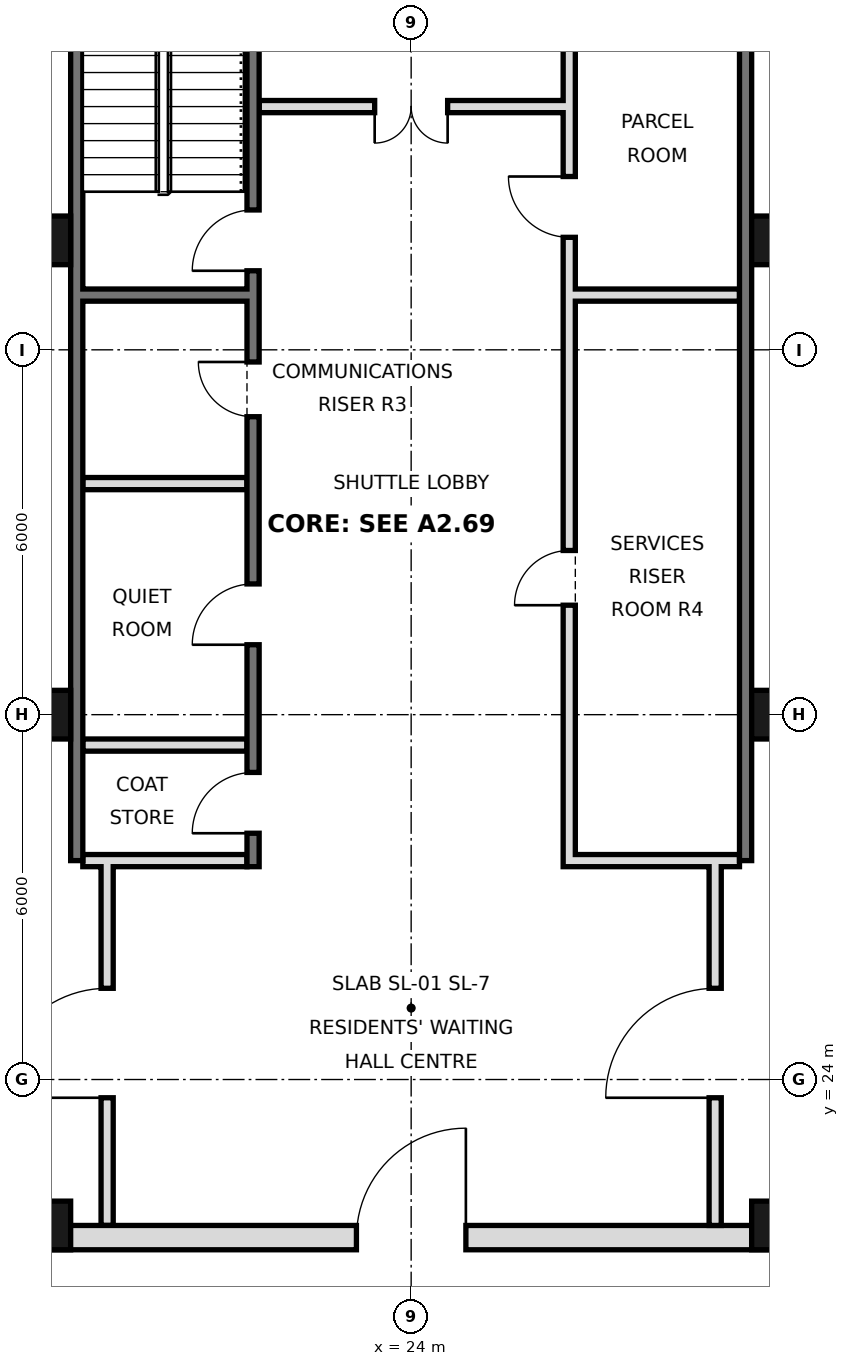
"""IFC4 building model, lengths in metres.
Left out: names, types, materials, properties, quantities, classifications, styles, units other than length and angle.
Written with IfcOpenShell. Run it as: python <this file> out.ifc"""

import sys

from ifc_helpers import new_model, si_unit, direction, frame, frame_2d, origin, origin_2d, place, context, subcontext, project, spatial, rectangle, hollow_rectangle, extrude, element, fill, save


model = new_model("IFC4")
c1 = context("Model", 3, precision=1e-05, world=origin(), true_north=direction((0.0, 1.0)))
c2 = subcontext(c1, "Body", "Model", "MODEL_VIEW")
j1 = project(units=[si_unit("LENGTHUNIT", "METRE"), si_unit("PLANEANGLEUNIT", "RADIAN")], contexts=[c1])
p1 = place(None, origin())
s1 = spatial("IfcSite", under=j1, at=p1, CompositionType="ELEMENT")
p2 = place(p1, origin())
s2 = spatial("IfcBuilding", under=s1, at=p2, CompositionType="ELEMENT")
p3 = place(p2, frame((0.0, 0.0, 273.8)))
s3 = spatial("IfcBuildingStorey", under=s2, at=p3, CompositionType="ELEMENT", Elevation=273.8)
for number, where, z_axis, x_axis in (
    (1, (18.0, 21.6, 0.0), (0.0, 0.0, 1.0), (1.0, 0.0, 0.0)),
    (2, (18.0, 30.0, 0.0), (0.0, 0.0, 1.0), (1.0, 0.0, 0.0)),
    (3, (18.0, 37.8, 0.0), (0.0, 0.0, 1.0), (1.0, 0.0, 0.0)),
    (4, (30.0, 21.6, 0.0), (0.0, 0.0, 1.0), (1.0, 0.0, 0.0)),
    (5, (30.0, 30.0, 0.0), (0.0, 0.0, 1.0), (1.0, 0.0, 0.0)),
    (6, (30.0, 37.8, 0.0), (0.0, 0.0, 1.0), (1.0, 0.0, 0.0)),
):
    element("IfcColumn", number, at=place(p3, frame(where, z_axis=z_axis, x_axis=x_axis)), inside=s3, PredefinedType="COLUMN", context=c2, shape_type="SweptSolid", body=[
        extrude(hollow_rectangle(XDim=0.8, YDim=0.8, WallThickness=0.032, at=origin_2d()), origin(), (0.0, 0.0, 1.0), 3.6),
    ])
for number, where, z_axis, x_axis in (
    (7, (18.5, 27.6, 0.0), (0.0, 0.0, 1.0), (0.0, 1.0, 0.0)),
    (8, (29.5, 27.6, 0.0), (0.0, 0.0, 1.0), (0.0, 1.0, 0.0)),
):
    element("IfcWall", number, at=place(p3, frame(where, z_axis=z_axis, x_axis=x_axis)), inside=s3, PredefinedType="SOLIDWALL", context=c2, shape_type="SweptSolid", body=[
        extrude(rectangle(XDim=17.5, YDim=0.2, at=frame_2d((8.75, 0.0))), origin(), (0.0, 0.0, 1.0), 3.42),
    ])
p4 = place(p3, frame((5.6, 21.4, 0.0), z_axis=(0.0, 0.0, 1.0), x_axis=(1.0, 0.0, 0.0)))
e9 = element("IfcWall", 9, at=p4, inside=s3, PredefinedType="SOLIDWALL", context=c2, shape_type="SweptSolid", body=[
    extrude(rectangle(XDim=36.8, YDim=0.4, at=frame_2d((18.4, 0.0))), origin(), (0.0, 0.0, 1.0), 3.42),
])
p5 = place(p4, frame((8.5, 0.0, 0.0)))
e10 = element("IfcOpeningElement", 10, at=p5, cuts=e9, PredefinedType="OPENING", context=c2, shape_type="SweptSolid", body=[
    extrude(rectangle(XDim=1.8, YDim=2.1, at=frame_2d((0.9, 1.05))), frame((0.0, 0.21, 0.0), z_axis=(0.0, -1.0, 0.0), x_axis=(1.0, 0.0, 0.0)), (0.0, 0.0, 1.0), 0.42),
])
p6 = place(p4, frame((17.5, 0.0, 0.0)))
e11 = element("IfcOpeningElement", 11, at=p6, cuts=e9, PredefinedType="OPENING", context=c2, shape_type="SweptSolid", body=[
    extrude(rectangle(XDim=1.8, YDim=2.1, at=frame_2d((0.9, 1.05))), frame((0.0, 0.21, 0.0), z_axis=(0.0, -1.0, 0.0), x_axis=(1.0, 0.0, 0.0)), (0.0, 0.0, 1.0), 0.42),
])
p7 = place(p4, frame((26.5, 0.0, 0.0)))
e12 = element("IfcOpeningElement", 12, at=p7, cuts=e9, PredefinedType="OPENING", context=c2, shape_type="SweptSolid", body=[
    extrude(rectangle(XDim=1.8, YDim=2.1, at=frame_2d((0.9, 1.05))), frame((0.0, 0.21, 0.0), z_axis=(0.0, -1.0, 0.0), x_axis=(1.0, 0.0, 0.0)), (0.0, 0.0, 1.0), 0.42),
])
p8 = place(p4, frame((4.5, 0.0, 0.0)))
e13 = element("IfcOpeningElement", 13, at=p8, cuts=e9, PredefinedType="OPENING", context=c2, shape_type="SweptSolid", body=[
    extrude(rectangle(XDim=1.2, YDim=2.1, at=frame_2d((0.6, 1.05))), frame((0.0, 0.21, 0.0), z_axis=(0.0, -1.0, 0.0), x_axis=(1.0, 0.0, 0.0)), (0.0, 0.0, 1.0), 0.42),
])
p9 = place(p4, frame((31.1, 0.0, 0.0)))
e14 = element("IfcOpeningElement", 14, at=p9, cuts=e9, PredefinedType="OPENING", context=c2, shape_type="SweptSolid", body=[
    extrude(rectangle(XDim=1.2, YDim=2.1, at=frame_2d((0.6, 1.05))), frame((0.0, 0.21, 0.0), z_axis=(0.0, -1.0, 0.0), x_axis=(1.0, 0.0, 0.0)), (0.0, 0.0, 1.0), 0.42),
])
p10 = place(p3, frame((19.0, 21.6, 0.0), z_axis=(0.0, 0.0, 1.0), x_axis=(0.0, 1.0, 0.0)))
e15 = element("IfcWall", 15, at=p10, inside=s3, PredefinedType="PARTITIONING", context=c2, shape_type="SweptSolid", body=[
    extrude(rectangle(XDim=6.0, YDim=0.2, at=frame_2d((3.0, 0.0))), origin(), (0.0, 0.0, 1.0), 3.42),
])
p11 = place(p10, frame((2.1, 0.0, 0.0)))
e16 = element("IfcOpeningElement", 16, at=p11, cuts=e15, PredefinedType="OPENING", context=c2, shape_type="SweptSolid", body=[
    extrude(rectangle(XDim=1.8, YDim=2.1, at=frame_2d((0.9, 1.05))), frame((0.0, 0.11, 0.0), z_axis=(0.0, -1.0, 0.0), x_axis=(1.0, 0.0, 0.0)), (0.0, 0.0, 1.0), 0.22),
])
p12 = place(p3, frame((29.0, 21.6, 0.0), z_axis=(0.0, 0.0, 1.0), x_axis=(0.0, 1.0, 0.0)))
e17 = element("IfcWall", 17, at=p12, inside=s3, PredefinedType="PARTITIONING", context=c2, shape_type="SweptSolid", body=[
    extrude(rectangle(XDim=6.0, YDim=0.2, at=frame_2d((3.0, 0.0))), origin(), (0.0, 0.0, 1.0), 3.42),
])
p13 = place(p12, frame((2.1, 0.0, 0.0)))
e18 = element("IfcOpeningElement", 18, at=p13, cuts=e17, PredefinedType="OPENING", context=c2, shape_type="SweptSolid", body=[
    extrude(rectangle(XDim=1.8, YDim=2.1, at=frame_2d((0.9, 1.05))), frame((0.0, 0.11, 0.0), z_axis=(0.0, -1.0, 0.0), x_axis=(1.0, 0.0, 0.0)), (0.0, 0.0, 1.0), 0.22),
])
p14 = place(p3, frame((21.4, 27.5, 0.0), z_axis=(0.0, 0.0, 1.0), x_axis=(0.0, 1.0, 0.0)))
e19 = element("IfcWall", 19, at=p14, inside=s3, PredefinedType="SOLIDWALL", context=c2, shape_type="SweptSolid", body=[
    extrude(rectangle(XDim=17.5, YDim=0.2, at=frame_2d((8.75, 0.0))), origin(), (0.0, 0.0, 1.0), 3.42),
])
p15 = place(p14, frame((0.55, 0.0, 0.0)))
e20 = element("IfcOpeningElement", 20, at=p15, cuts=e19, PredefinedType="OPENING", context=c2, shape_type="SweptSolid", body=[
    extrude(rectangle(XDim=1.0, YDim=2.1, at=frame_2d((0.5, 1.05))), frame((0.0, 0.11, 0.0), z_axis=(0.0, -1.0, 0.0), x_axis=(1.0, 0.0, 0.0)), (0.0, 0.0, 1.0), 0.22),
])
p16 = place(p14, frame((3.65, 0.0, 0.0)))
e21 = element("IfcOpeningElement", 21, at=p16, cuts=e19, PredefinedType="OPENING", context=c2, shape_type="SweptSolid", body=[
    extrude(rectangle(XDim=1.0, YDim=2.1, at=frame_2d((0.5, 1.05))), frame((0.0, 0.11, 0.0), z_axis=(0.0, -1.0, 0.0), x_axis=(1.0, 0.0, 0.0)), (0.0, 0.0, 1.0), 0.22),
])
p17 = place(p14, frame((9.8, 0.0, 0.0)))
e22 = element("IfcOpeningElement", 22, at=p17, cuts=e19, PredefinedType="OPENING", context=c2, shape_type="SweptSolid", body=[
    extrude(rectangle(XDim=1.0, YDim=2.1, at=frame_2d((0.5, 1.05))), frame((0.0, 0.11, 0.0), z_axis=(0.0, -1.0, 0.0), x_axis=(1.0, 0.0, 0.0)), (0.0, 0.0, 1.0), 0.22),
])
p18 = place(p14, frame((7.4, 0.0, 0.0)))
e23 = element("IfcOpeningElement", 23, at=p18, cuts=e19, PredefinedType="OPENING", context=c2, shape_type="SweptSolid", body=[
    extrude(rectangle(XDim=0.9, YDim=2.1, at=frame_2d((0.45, 1.05))), frame((0.0, 0.11, 0.0), z_axis=(0.0, -1.0, 0.0), x_axis=(1.0, 0.0, 0.0)), (0.0, 0.0, 1.0), 0.22),
])
p19 = place(p3, frame((26.6, 27.5, 0.0), z_axis=(0.0, 0.0, 1.0), x_axis=(0.0, 1.0, 0.0)))
e24 = element("IfcWall", 24, at=p19, inside=s3, PredefinedType="SOLIDWALL", context=c2, shape_type="SweptSolid", body=[
    extrude(rectangle(XDim=17.5, YDim=0.2, at=frame_2d((8.75, 0.0))), origin(), (0.0, 0.0, 1.0), 3.42),
])
p20 = place(p19, frame((4.3, 0.0, 0.0)))
e25 = element("IfcOpeningElement", 25, at=p20, cuts=e24, PredefinedType="OPENING", context=c2, shape_type="SweptSolid", body=[
    extrude(rectangle(XDim=0.9, YDim=2.1, at=frame_2d((0.45, 1.05))), frame((0.0, 0.11, 0.0), z_axis=(0.0, -1.0, 0.0), x_axis=(1.0, 0.0, 0.0)), (0.0, 0.0, 1.0), 0.22),
])
p21 = place(p19, frame((10.35, 0.0, 0.0)))
e26 = element("IfcOpeningElement", 26, at=p21, cuts=e24, PredefinedType="OPENING", context=c2, shape_type="SweptSolid", body=[
    extrude(rectangle(XDim=1.0, YDim=2.1, at=frame_2d((0.5, 1.05))), frame((0.0, 0.11, 0.0), z_axis=(0.0, -1.0, 0.0), x_axis=(1.0, 0.0, 0.0)), (0.0, 0.0, 1.0), 0.22),
])
p22 = place(p19, frame((15.475, 0.0, 0.0)))
e27 = element("IfcOpeningElement", 27, at=p22, cuts=e24, PredefinedType="OPENING", context=c2, shape_type="SweptSolid", body=[
    extrude(rectangle(XDim=1.0, YDim=2.1, at=frame_2d((0.5, 1.05))), frame((0.0, 0.11, 0.0), z_axis=(0.0, -1.0, 0.0), x_axis=(1.0, 0.0, 0.0)), (0.0, 0.0, 1.0), 0.22),
])
p23 = place(p3, frame((18.6, 27.6, 0.0), z_axis=(0.0, 0.0, 1.0), x_axis=(1.0, 0.0, 0.0)))
e28 = element("IfcWall", 28, at=p23, inside=s3, PredefinedType="PARTITIONING", context=c2, shape_type="SweptSolid", body=[
    extrude(rectangle(XDim=2.7, YDim=0.2, at=frame_2d((1.35, 0.0))), origin(), (0.0, 0.0, 1.0), 3.42),
])
p24 = place(p3, frame((26.7, 27.6, 0.0), z_axis=(0.0, 0.0, 1.0), x_axis=(1.0, 0.0, 0.0)))
e29 = element("IfcWall", 29, at=p24, inside=s3, PredefinedType="SOLIDWALL", context=c2, shape_type="SweptSolid", body=[
    extrude(rectangle(XDim=2.7, YDim=0.2, at=frame_2d((1.35, 0.0))), origin(), (0.0, 0.0, 1.0), 3.42),
])
p25 = place(p3, frame((18.6, 29.5, 0.0), z_axis=(0.0, 0.0, 1.0), x_axis=(1.0, 0.0, 0.0)))
e30 = element("IfcWall", 30, at=p25, inside=s3, PredefinedType="PARTITIONING", context=c2, shape_type="SweptSolid", body=[
    extrude(rectangle(XDim=2.7, YDim=0.2, at=frame_2d((1.35, 0.0))), origin(), (0.0, 0.0, 1.0), 3.42),
])
for number, where, z_axis, x_axis in (
    (31, (18.6, 33.8, 0.0), (0.0, 0.0, 1.0), (1.0, 0.0, 0.0)),
    (32, (18.6, 36.9, 0.0), (0.0, 0.0, 1.0), (1.0, 0.0, 0.0)),
    (33, (26.7, 36.9, 0.0), (0.0, 0.0, 1.0), (1.0, 0.0, 0.0)),
):
    element("IfcWall", number, at=place(p3, frame(where, z_axis=z_axis, x_axis=x_axis)), inside=s3, PredefinedType="SOLIDWALL", context=c2, shape_type="SweptSolid", body=[
        extrude(rectangle(XDim=2.7, YDim=0.2, at=frame_2d((1.35, 0.0))), origin(), (0.0, 0.0, 1.0), 3.42),
    ])
p26 = place(p3, frame((21.5, 40.0, 0.0), z_axis=(0.0, 0.0, 1.0), x_axis=(1.0, 0.0, 0.0)))
e34 = element("IfcWall", 34, at=p26, inside=s3, PredefinedType="PARTITIONING", context=c2, shape_type="SweptSolid", body=[
    extrude(rectangle(XDim=5.0, YDim=0.2, at=frame_2d((2.5, 0.0))), origin(), (0.0, 0.0, 1.0), 3.42),
])
p27 = place(p26, frame((1.9, 0.0, 0.0)))
e35 = element("IfcOpeningElement", 35, at=p27, cuts=e34, PredefinedType="OPENING", context=c2, shape_type="SweptSolid", body=[
    extrude(rectangle(XDim=1.2, YDim=2.1, at=frame_2d((0.6, 1.05))), frame((0.0, 0.11, 0.0), z_axis=(0.0, -1.0, 0.0), x_axis=(1.0, 0.0, 0.0)), (0.0, 0.0, 1.0), 0.22),
])
p28 = place(p11, origin())
e36 = element("IfcDoor", 36, at=p28, inside=s3, OperationType="SINGLE_SWING_LEFT", PredefinedType="DOOR", context=c2, shape_type="SweptSolid", body=[
    extrude(rectangle(XDim=1.8, YDim=2.1, at=frame_2d((0.9, 1.05))), frame((0.0, 0.025, 0.0), z_axis=(0.0, -1.0, 0.0), x_axis=(1.0, 0.0, 0.0)), (0.0, 0.0, 1.0), 0.05),
])
fill(e16, e36)
p29 = place(p6, frame((1.8, 0.0, 0.0), z_axis=(0.0, 0.0, 1.0), x_axis=(-1.0, 0.0, 0.0)))
e37 = element("IfcDoor", 37, at=p29, inside=s3, OperationType="SINGLE_SWING_LEFT", PredefinedType="DOOR", context=c2, shape_type="SweptSolid", body=[
    extrude(rectangle(XDim=1.8, YDim=2.1, at=frame_2d((0.9, 1.05))), frame((0.0, 0.025, 0.0), z_axis=(0.0, -1.0, 0.0), x_axis=(1.0, 0.0, 0.0)), (0.0, 0.0, 1.0), 0.05),
])
fill(e11, e37)
p30 = place(p13, origin())
e38 = element("IfcDoor", 38, at=p30, inside=s3, OperationType="SINGLE_SWING_LEFT", PredefinedType="DOOR", context=c2, shape_type="SweptSolid", body=[
    extrude(rectangle(XDim=1.8, YDim=2.1, at=frame_2d((0.9, 1.05))), frame((0.0, 0.025, 0.0), z_axis=(0.0, -1.0, 0.0), x_axis=(1.0, 0.0, 0.0)), (0.0, 0.0, 1.0), 0.05),
])
fill(e18, e38)
p31 = place(p27, frame((1.2, 0.0, 0.0), z_axis=(0.0, 0.0, 1.0), x_axis=(-1.0, 0.0, 0.0)))
e39 = element("IfcDoor", 39, at=p31, inside=s3, OperationType="DOUBLE_DOOR_SINGLE_SWING", PredefinedType="DOOR", context=c2, shape_type="SweptSolid", body=[
    extrude(rectangle(XDim=1.2, YDim=2.1, at=frame_2d((0.6, 1.05))), frame((0.0, 0.025, 0.0), z_axis=(0.0, -1.0, 0.0), x_axis=(1.0, 0.0, 0.0)), (0.0, 0.0, 1.0), 0.05),
])
fill(e35, e39)
p32 = place(p15, origin())
e40 = element("IfcDoor", 40, at=p32, inside=s3, OperationType="SINGLE_SWING_LEFT", PredefinedType="DOOR", context=c2, shape_type="SweptSolid", body=[
    extrude(rectangle(XDim=1.0, YDim=2.1, at=frame_2d((0.5, 1.05))), frame((0.0, 0.025, 0.0), z_axis=(0.0, -1.0, 0.0), x_axis=(1.0, 0.0, 0.0)), (0.0, 0.0, 1.0), 0.05),
])
fill(e20, e40)
p33 = place(p16, origin())
e41 = element("IfcDoor", 41, at=p33, inside=s3, OperationType="SINGLE_SWING_LEFT", PredefinedType="DOOR", context=c2, shape_type="SweptSolid", body=[
    extrude(rectangle(XDim=1.0, YDim=2.1, at=frame_2d((0.5, 1.05))), frame((0.0, 0.025, 0.0), z_axis=(0.0, -1.0, 0.0), x_axis=(1.0, 0.0, 0.0)), (0.0, 0.0, 1.0), 0.05),
])
fill(e21, e41)
p34 = place(p17, origin())
e42 = element("IfcDoor", 42, at=p34, inside=s3, OperationType="SINGLE_SWING_LEFT", PredefinedType="DOOR", context=c2, shape_type="SweptSolid", body=[
    extrude(rectangle(XDim=1.0, YDim=2.1, at=frame_2d((0.5, 1.05))), frame((0.0, 0.025, 0.0), z_axis=(0.0, -1.0, 0.0), x_axis=(1.0, 0.0, 0.0)), (0.0, 0.0, 1.0), 0.05),
])
fill(e22, e42)
p35 = place(p18, frame((0.9, 0.0, 0.0), z_axis=(0.0, 0.0, 1.0), x_axis=(-1.0, 0.0, 0.0)))
e43 = element("IfcDoor", 43, at=p35, inside=s3, OperationType="SINGLE_SWING_LEFT", PredefinedType="DOOR", context=c2, shape_type="SweptSolid", body=[
    extrude(rectangle(XDim=0.9, YDim=2.1, at=frame_2d((0.45, 1.05))), frame((0.0, 0.025, 0.0), z_axis=(0.0, -1.0, 0.0), x_axis=(1.0, 0.0, 0.0)), (0.0, 0.0, 1.0), 0.05),
])
fill(e23, e43)
p36 = place(p20, origin())
e44 = element("IfcDoor", 44, at=p36, inside=s3, OperationType="SINGLE_SWING_LEFT", PredefinedType="DOOR", context=c2, shape_type="SweptSolid", body=[
    extrude(rectangle(XDim=0.9, YDim=2.1, at=frame_2d((0.45, 1.05))), frame((0.0, 0.025, 0.0), z_axis=(0.0, -1.0, 0.0), x_axis=(1.0, 0.0, 0.0)), (0.0, 0.0, 1.0), 0.05),
])
fill(e25, e44)
p37 = place(p21, frame((1.0, 0.0, 0.0), z_axis=(0.0, 0.0, 1.0), x_axis=(-1.0, 0.0, 0.0)))
e45 = element("IfcDoor", 45, at=p37, inside=s3, OperationType="SINGLE_SWING_LEFT", PredefinedType="DOOR", context=c2, shape_type="SweptSolid", body=[
    extrude(rectangle(XDim=1.0, YDim=2.1, at=frame_2d((0.5, 1.05))), frame((0.0, 0.025, 0.0), z_axis=(0.0, -1.0, 0.0), x_axis=(1.0, 0.0, 0.0)), (0.0, 0.0, 1.0), 0.05),
])
fill(e26, e45)
save(model, sys.argv[1])
